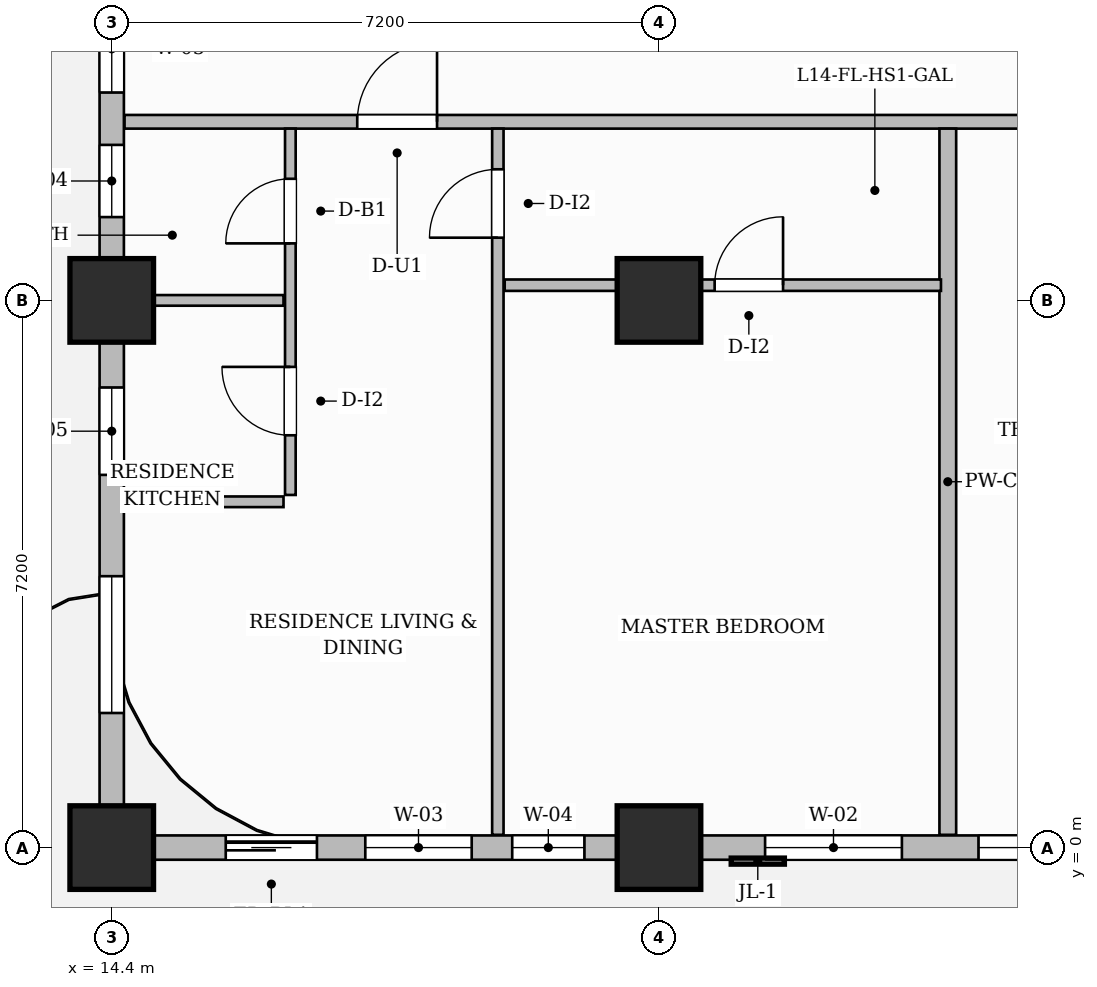
"""IFC4 building model, lengths in metres.
Left out: names, types, materials, properties, quantities, classifications, styles, units other than length and angle.
Written with IfcOpenShell. Run it as: python <this file> out.ifc"""

import sys

from ifc_helpers import new_model, si_unit, direction, frame, frame_2d, origin, origin_2d, place, context, subcontext, project, spatial, rectangle, extrude, source, transform, mapped, element, fill, save


model = new_model("IFC4")
c1 = context("Model", 3, precision=1e-05, world=origin(), true_north=direction((0.0, 1.0)))
c2 = subcontext(c1, "Body", "Model", "MODEL_VIEW")
j1 = project(units=[si_unit("LENGTHUNIT", "METRE"), si_unit("PLANEANGLEUNIT", "RADIAN")], contexts=[c1])
p1 = place(None, origin())
s1 = spatial("IfcSite", under=j1, at=p1, CompositionType="ELEMENT")
p2 = place(p1, origin())
s2 = spatial("IfcBuilding", under=s1, at=p2, CompositionType="ELEMENT")
p3 = place(p2, frame((0.0, 0.0, 62.0)))
s3 = spatial("IfcBuildingStorey", under=s2, at=p3, CompositionType="ELEMENT", Elevation=62.0)
m1 = source(origin(), c2, "Body", "SweptSolid", [
    extrude(rectangle(XDim=1.1, YDim=1.1, at=origin_2d()), origin(), (0.0, 0.0, 1.0), 3.7),
])
for number, where, z_axis, x_axis in (
    (1, (14.4, 0.0, 0.0), (0.0, 0.0, 1.0), (1.0, 0.0, 0.0)),
    (2, (14.4, 7.2, 0.0), (0.0, 0.0, 1.0), (1.0, 0.0, 0.0)),
    (3, (21.6, 0.0, 0.0), (0.0, 0.0, 1.0), (1.0, 0.0, 0.0)),
    (4, (21.6, 7.2, 0.0), (0.0, 0.0, 1.0), (1.0, 0.0, 0.0)),
):
    element("IfcColumn", number, at=place(p3, frame(where, z_axis=z_axis, x_axis=x_axis)), inside=s3, PredefinedType="COLUMN", context=c2, shape_type="MappedRepresentation", body=[
        mapped(m1, transform((0.0, 0.0, 0.0), scale=1.0)),
    ])
p4 = place(p3, frame((14.568, 9.55, 0.0), z_axis=(0.0, 0.0, 1.0), x_axis=(1.0, 0.0, 0.0)))
e5 = element("IfcWall", 5, at=p4, inside=s3, PredefinedType="PARTITIONING", context=c2, shape_type="SweptSolid", body=[
    extrude(rectangle(XDim=15.542, YDim=0.18, at=frame_2d((7.771, 0.0))), origin(), (0.0, 0.0, 1.0), 3.45),
])
p5 = place(p4, frame((3.062, 0.0, 0.0)))
e6 = element("IfcOpeningElement", 6, at=p5, cuts=e5, PredefinedType="OPENING", context=c2, shape_type="SweptSolid", body=[
    extrude(rectangle(XDim=1.05, YDim=2.25, at=frame_2d((0.525, 1.125))), frame((0.0, 0.1, 0.0), z_axis=(0.0, -1.0, 0.0), x_axis=(1.0, 0.0, 0.0)), (0.0, 0.0, 1.0), 0.2),
])
p6 = place(p4, frame((12.532, 0.0, 0.0)))
e7 = element("IfcOpeningElement", 7, at=p6, cuts=e5, PredefinedType="OPENING", context=c2, shape_type="SweptSolid", body=[
    extrude(rectangle(XDim=1.4, YDim=2.35, at=frame_2d((0.7, 1.175))), frame((0.0, 0.1, 0.0), z_axis=(0.0, -1.0, 0.0), x_axis=(1.0, 0.0, 0.0)), (0.0, 0.0, 1.0), 0.2),
])
p7 = place(p3, frame((25.4, 0.168, 0.0), z_axis=(0.0, 0.0, 1.0), x_axis=(0.0, 1.0, 0.0)))
e8 = element("IfcWall", 8, at=p7, inside=s3, PredefinedType="PARTITIONING", context=c2, shape_type="SweptSolid", body=[
    extrude(rectangle(XDim=9.292, YDim=0.22, at=frame_2d((4.646, 0.0))), origin(), (0.0, 0.0, 1.0), 3.035),
])
p8 = place(p3, frame((16.75, 4.64, 0.0), z_axis=(0.0, 0.0, 1.0), x_axis=(0.0, 1.0, 0.0)))
e9 = element("IfcWall", 9, at=p8, inside=s3, PredefinedType="PARTITIONING", context=c2, shape_type="SweptSolid", body=[
    extrude(rectangle(XDim=4.82, YDim=0.14, at=frame_2d((2.41, 0.0))), origin(), (0.0, 0.0, 1.0), 3.45),
])
p9 = place(p8, frame((0.785, 0.0, 0.0)))
e10 = element("IfcOpeningElement", 10, at=p9, cuts=e9, PredefinedType="OPENING", context=c2, shape_type="SweptSolid", body=[
    extrude(rectangle(XDim=0.9, YDim=2.15, at=frame_2d((0.45, 1.075))), frame((0.0, 0.08, 0.0), z_axis=(0.0, -1.0, 0.0), x_axis=(1.0, 0.0, 0.0)), (0.0, 0.0, 1.0), 0.16),
])
p10 = place(p8, frame((3.31, 0.0, 0.0)))
e11 = element("IfcOpeningElement", 11, at=p10, cuts=e9, PredefinedType="OPENING", context=c2, shape_type="SweptSolid", body=[
    extrude(rectangle(XDim=0.85, YDim=2.1, at=frame_2d((0.425, 1.05))), frame((0.0, 0.08, 0.0), z_axis=(0.0, -1.0, 0.0), x_axis=(1.0, 0.0, 0.0)), (0.0, 0.0, 1.0), 0.16),
])
p11 = place(p3, frame((14.59, 7.2, 0.0), z_axis=(0.0, 0.0, 1.0), x_axis=(1.0, 0.0, 0.0)))
e12 = element("IfcWall", 12, at=p11, inside=s3, PredefinedType="PARTITIONING", context=c2, shape_type="SweptSolid", body=[
    extrude(rectangle(XDim=2.07, YDim=0.14, at=frame_2d((1.035, 0.0))), origin(), (0.0, 0.0, 1.0), 2.885),
])
p12 = place(p3, frame((14.568, 4.55, 0.0), z_axis=(0.0, 0.0, 1.0), x_axis=(1.0, 0.0, 0.0)))
e13 = element("IfcWall", 13, at=p12, inside=s3, PredefinedType="PARTITIONING", context=c2, shape_type="SweptSolid", body=[
    extrude(rectangle(XDim=2.092, YDim=0.14, at=frame_2d((1.046, 0.0))), origin(), (0.0, 0.0, 1.0), 3.45),
])
p13 = place(p3, frame((19.48, 0.168, 0.0), z_axis=(0.0, 0.0, 1.0), x_axis=(0.0, 1.0, 0.0)))
e14 = element("IfcWall", 14, at=p13, inside=s3, PredefinedType="PARTITIONING", context=c2, shape_type="SweptSolid", body=[
    extrude(rectangle(XDim=9.292, YDim=0.15, at=frame_2d((4.646, 0.0))), origin(), (0.0, 0.0, 1.0), 3.45),
])
p14 = place(p13, frame((7.857, 0.0, 0.0)))
e15 = element("IfcOpeningElement", 15, at=p14, cuts=e14, PredefinedType="OPENING", context=c2, shape_type="SweptSolid", body=[
    extrude(rectangle(XDim=0.9, YDim=2.15, at=frame_2d((0.45, 1.075))), frame((0.0, 0.085, 0.0), z_axis=(0.0, -1.0, 0.0), x_axis=(1.0, 0.0, 0.0)), (0.0, 0.0, 1.0), 0.17),
])
p15 = place(p3, frame((19.57, 7.4, 0.0), z_axis=(0.0, 0.0, 1.0), x_axis=(1.0, 0.0, 0.0)))
e16 = element("IfcWall", 16, at=p15, inside=s3, PredefinedType="PARTITIONING", context=c2, shape_type="SweptSolid", body=[
    extrude(rectangle(XDim=5.74, YDim=0.15, at=frame_2d((2.87, 0.0))), origin(), (0.0, 0.0, 1.0), 2.885),
])
p16 = place(p15, frame((2.762, 0.0, 0.0)))
e17 = element("IfcOpeningElement", 17, at=p16, cuts=e16, PredefinedType="OPENING", context=c2, shape_type="SweptSolid", body=[
    extrude(rectangle(XDim=0.9, YDim=2.15, at=frame_2d((0.45, 1.075))), frame((0.0, 0.085, 0.0), z_axis=(0.0, -1.0, 0.0), x_axis=(1.0, 0.0, 0.0)), (0.0, 0.0, 1.0), 0.17),
])
p17 = place(p3, frame((14.4, 0.0, 0.0), z_axis=(0.0, 0.0, 1.0), x_axis=(1.0, 0.0, 0.0)))
e18 = element("IfcWall", 18, at=p17, inside=s3, PredefinedType="SOLIDWALL", context=c2, shape_type="SweptSolid", body=[
    extrude(rectangle(XDim=43.2, YDim=0.32, at=frame_2d((21.6, 0.0))), origin(), (0.0, 0.0, 1.0), 2.885),
])
p18 = place(p17, frame((1.5, 0.0, 0.0)))
e19 = element("IfcOpeningElement", 19, at=p18, cuts=e18, PredefinedType="OPENING", context=c2, shape_type="SweptSolid", body=[
    extrude(rectangle(XDim=1.2, YDim=2.2, at=frame_2d((0.6, 1.1))), frame((0.0, 0.17, 0.0), z_axis=(0.0, -1.0, 0.0), x_axis=(1.0, 0.0, 0.0)), (0.0, 0.0, 1.0), 0.34),
])
p19 = place(p17, frame((3.336, 0.0, 0.8)))
e20 = element("IfcOpeningElement", 20, at=p19, cuts=e18, PredefinedType="OPENING", context=c2, shape_type="SweptSolid", body=[
    extrude(rectangle(XDim=1.4, YDim=1.85, at=frame_2d((0.7, 0.925))), frame((0.0, 0.17, 0.0), z_axis=(0.0, -1.0, 0.0), x_axis=(1.0, 0.0, 0.0)), (0.0, 0.0, 1.0), 0.34),
])
p20 = place(p17, frame((5.269, 0.0, 0.8)))
e21 = element("IfcOpeningElement", 21, at=p20, cuts=e18, PredefinedType="OPENING", context=c2, shape_type="SweptSolid", body=[
    extrude(rectangle(XDim=0.95, YDim=1.75, at=frame_2d((0.475, 0.875))), frame((0.0, 0.17, 0.0), z_axis=(0.0, -1.0, 0.0), x_axis=(1.0, 0.0, 0.0)), (0.0, 0.0, 1.0), 0.34),
])
p21 = place(p17, frame((8.596, 0.0, 0.8)))
e22 = element("IfcOpeningElement", 22, at=p21, cuts=e18, PredefinedType="OPENING", context=c2, shape_type="SweptSolid", body=[
    extrude(rectangle(XDim=1.8, YDim=1.85, at=frame_2d((0.9, 0.925))), frame((0.0, 0.17, 0.0), z_axis=(0.0, -1.0, 0.0), x_axis=(1.0, 0.0, 0.0)), (0.0, 0.0, 1.0), 0.34),
])
p22 = place(p17, frame((11.404, 0.0, 0.8)))
e23 = element("IfcOpeningElement", 23, at=p22, cuts=e18, PredefinedType="OPENING", context=c2, shape_type="SweptSolid", body=[
    extrude(rectangle(XDim=1.8, YDim=1.85, at=frame_2d((0.9, 0.925))), frame((0.0, 0.17, 0.0), z_axis=(0.0, -1.0, 0.0), x_axis=(1.0, 0.0, 0.0)), (0.0, 0.0, 1.0), 0.34),
])
p23 = place(p17, frame((16.804, 0.0, 0.8)))
e24 = element("IfcOpeningElement", 24, at=p23, cuts=e18, PredefinedType="OPENING", context=c2, shape_type="SweptSolid", body=[
    extrude(rectangle(XDim=1.8, YDim=1.85, at=frame_2d((0.9, 0.925))), frame((0.0, 0.17, 0.0), z_axis=(0.0, -1.0, 0.0), x_axis=(1.0, 0.0, 0.0)), (0.0, 0.0, 1.0), 0.34),
])
p24 = place(p17, frame((21.725, 0.0, 0.8)))
e25 = element("IfcOpeningElement", 25, at=p24, cuts=e18, PredefinedType="OPENING", context=c2, shape_type="SweptSolid", body=[
    extrude(rectangle(XDim=1.8, YDim=1.85, at=frame_2d((0.9, 0.925))), frame((0.0, 0.17, 0.0), z_axis=(0.0, -1.0, 0.0), x_axis=(1.0, 0.0, 0.0)), (0.0, 0.0, 1.0), 0.34),
])
p25 = place(p17, frame((24.475, 0.0, 0.8)))
e26 = element("IfcOpeningElement", 26, at=p25, cuts=e18, PredefinedType="OPENING", context=c2, shape_type="SweptSolid", body=[
    extrude(rectangle(XDim=1.8, YDim=1.85, at=frame_2d((0.9, 0.925))), frame((0.0, 0.17, 0.0), z_axis=(0.0, -1.0, 0.0), x_axis=(1.0, 0.0, 0.0)), (0.0, 0.0, 1.0), 0.34),
])
p26 = place(p17, frame((29.075, 0.0, 0.8)))
e27 = element("IfcOpeningElement", 27, at=p26, cuts=e18, PredefinedType="OPENING", context=c2, shape_type="SweptSolid", body=[
    extrude(rectangle(XDim=1.8, YDim=1.85, at=frame_2d((0.9, 0.925))), frame((0.0, 0.17, 0.0), z_axis=(0.0, -1.0, 0.0), x_axis=(1.0, 0.0, 0.0)), (0.0, 0.0, 1.0), 0.34),
])
p27 = place(p17, frame((32.125, 0.0, 0.8)))
e28 = element("IfcOpeningElement", 28, at=p27, cuts=e18, PredefinedType="OPENING", context=c2, shape_type="SweptSolid", body=[
    extrude(rectangle(XDim=1.8, YDim=1.85, at=frame_2d((0.9, 0.925))), frame((0.0, 0.17, 0.0), z_axis=(0.0, -1.0, 0.0), x_axis=(1.0, 0.0, 0.0)), (0.0, 0.0, 1.0), 0.34),
])
p28 = place(p17, frame((36.875, 0.0, 0.8)))
e29 = element("IfcOpeningElement", 29, at=p28, cuts=e18, PredefinedType="OPENING", context=c2, shape_type="SweptSolid", body=[
    extrude(rectangle(XDim=1.8, YDim=1.85, at=frame_2d((0.9, 0.925))), frame((0.0, 0.17, 0.0), z_axis=(0.0, -1.0, 0.0), x_axis=(1.0, 0.0, 0.0)), (0.0, 0.0, 1.0), 0.34),
])
p29 = place(p17, frame((39.925, 0.0, 0.8)))
e30 = element("IfcOpeningElement", 30, at=p29, cuts=e18, PredefinedType="OPENING", context=c2, shape_type="SweptSolid", body=[
    extrude(rectangle(XDim=1.8, YDim=1.85, at=frame_2d((0.9, 0.925))), frame((0.0, 0.17, 0.0), z_axis=(0.0, -1.0, 0.0), x_axis=(1.0, 0.0, 0.0)), (0.0, 0.0, 1.0), 0.34),
])
p30 = place(p3, frame((14.4, 0.05, 0.0), z_axis=(0.0, 0.0, 1.0), x_axis=(0.0, 1.0, 0.0)))
e31 = element("IfcWall", 31, at=p30, inside=s3, PredefinedType="SOLIDWALL", context=c2, shape_type="SweptSolid", body=[
    extrude(rectangle(XDim=21.5, YDim=0.32, at=frame_2d((10.75, 0.0))), origin(), (0.0, 0.0, 1.0), 2.885),
])
p31 = place(p30, frame((1.721, 0.0, 0.8)))
e32 = element("IfcOpeningElement", 32, at=p31, cuts=e31, PredefinedType="OPENING", context=c2, shape_type="SweptSolid", body=[
    extrude(rectangle(XDim=1.8, YDim=1.85, at=frame_2d((0.9, 0.925))), frame((0.0, 0.17, 0.0), z_axis=(0.0, -1.0, 0.0), x_axis=(1.0, 0.0, 0.0)), (0.0, 0.0, 1.0), 0.34),
])
p32 = place(p30, frame((4.854, 0.0, 0.8)))
e33 = element("IfcOpeningElement", 33, at=p32, cuts=e31, PredefinedType="OPENING", context=c2, shape_type="SweptSolid", body=[
    extrude(rectangle(XDim=1.15, YDim=1.8, at=frame_2d((0.575, 0.9))), frame((0.0, 0.17, 0.0), z_axis=(0.0, -1.0, 0.0), x_axis=(1.0, 0.0, 0.0)), (0.0, 0.0, 1.0), 0.34),
])
p33 = place(p30, frame((8.246, 0.0, 0.8)))
e34 = element("IfcOpeningElement", 34, at=p33, cuts=e31, PredefinedType="OPENING", context=c2, shape_type="SweptSolid", body=[
    extrude(rectangle(XDim=0.95, YDim=1.75, at=frame_2d((0.475, 0.875))), frame((0.0, 0.17, 0.0), z_axis=(0.0, -1.0, 0.0), x_axis=(1.0, 0.0, 0.0)), (0.0, 0.0, 1.0), 0.34),
])
p34 = place(p30, frame((9.885, 0.0, 0.8)))
e35 = element("IfcOpeningElement", 35, at=p34, cuts=e31, PredefinedType="OPENING", context=c2, shape_type="SweptSolid", body=[
    extrude(rectangle(XDim=1.15, YDim=1.8, at=frame_2d((0.575, 0.9))), frame((0.0, 0.17, 0.0), z_axis=(0.0, -1.0, 0.0), x_axis=(1.0, 0.0, 0.0)), (0.0, 0.0, 1.0), 0.34),
])
p35 = place(p30, frame((11.789, 0.0, 0.8)))
e36 = element("IfcOpeningElement", 36, at=p35, cuts=e31, PredefinedType="OPENING", context=c2, shape_type="SweptSolid", body=[
    extrude(rectangle(XDim=1.4, YDim=1.85, at=frame_2d((0.7, 0.925))), frame((0.0, 0.17, 0.0), z_axis=(0.0, -1.0, 0.0), x_axis=(1.0, 0.0, 0.0)), (0.0, 0.0, 1.0), 0.34),
])
p36 = place(p30, frame((15.675, 0.0, 0.8)))
e37 = element("IfcOpeningElement", 37, at=p36, cuts=e31, PredefinedType="OPENING", context=c2, shape_type="SweptSolid", body=[
    extrude(rectangle(XDim=1.8, YDim=1.85, at=frame_2d((0.9, 0.925))), frame((0.0, 0.17, 0.0), z_axis=(0.0, -1.0, 0.0), x_axis=(1.0, 0.0, 0.0)), (0.0, 0.0, 1.0), 0.34),
])
p37 = place(p30, frame((18.425, 0.0, 0.8)))
e38 = element("IfcOpeningElement", 38, at=p37, cuts=e31, PredefinedType="OPENING", context=c2, shape_type="SweptSolid", body=[
    extrude(rectangle(XDim=1.8, YDim=1.85, at=frame_2d((0.9, 0.925))), frame((0.0, 0.17, 0.0), z_axis=(0.0, -1.0, 0.0), x_axis=(1.0, 0.0, 0.0)), (0.0, 0.0, 1.0), 0.34),
])
m2 = source(origin(), c2, "Body", "SweptSolid", [
    extrude(rectangle(XDim=0.9, YDim=2.15, at=frame_2d((0.45, 1.075))), frame((0.0, 0.025, 0.0), z_axis=(0.0, -1.0, 0.0), x_axis=(1.0, 0.0, 0.0)), (0.0, 0.0, 1.0), 0.05),
])
p38 = place(p9, origin())
e39 = element("IfcDoor", 39, at=p38, inside=s3, OperationType="SINGLE_SWING_RIGHT", PredefinedType="DOOR", context=c2, shape_type="MappedRepresentation", body=[
    mapped(m2, transform((0.0, 0.0, 0.0), scale=1.0)),
])
fill(e10, e39)
m3 = source(origin(), c2, "Body", "SweptSolid", [
    extrude(rectangle(XDim=0.85, YDim=2.1, at=frame_2d((0.425, 1.05))), frame((0.0, 0.025, 0.0), z_axis=(0.0, -1.0, 0.0), x_axis=(1.0, 0.0, 0.0)), (0.0, 0.0, 1.0), 0.05),
])
p39 = place(p10, origin())
e40 = element("IfcDoor", 40, at=p39, inside=s3, OperationType="SINGLE_SWING_LEFT", PredefinedType="DOOR", context=c2, shape_type="MappedRepresentation", body=[
    mapped(m3, transform((0.0, 0.0, 0.0), scale=1.0)),
])
fill(e11, e40)
m4 = source(origin(), c2, "Body", "SweptSolid", [
    extrude(rectangle(XDim=1.05, YDim=2.25, at=frame_2d((0.525, 1.125))), frame((0.0, 0.025, 0.0), z_axis=(0.0, -1.0, 0.0), x_axis=(1.0, 0.0, 0.0)), (0.0, 0.0, 1.0), 0.05),
])
p40 = place(p5, origin())
e41 = element("IfcDoor", 41, at=p40, inside=s3, OperationType="SINGLE_SWING_RIGHT", PredefinedType="DOOR", context=c2, shape_type="MappedRepresentation", body=[
    mapped(m4, transform((0.0, 0.0, 0.0), scale=1.0)),
])
fill(e6, e41)
p41 = place(p14, origin())
e42 = element("IfcDoor", 42, at=p41, inside=s3, OperationType="SINGLE_SWING_LEFT", PredefinedType="DOOR", context=c2, shape_type="MappedRepresentation", body=[
    mapped(m2, transform((0.0, 0.0, 0.0), scale=1.0)),
])
fill(e15, e42)
p42 = place(p16, origin())
e43 = element("IfcDoor", 43, at=p42, inside=s3, OperationType="SINGLE_SWING_RIGHT", PredefinedType="DOOR", context=c2, shape_type="MappedRepresentation", body=[
    mapped(m2, transform((0.0, 0.0, 0.0), scale=1.0)),
])
fill(e17, e43)
m5 = source(origin(), c2, "Body", "SweptSolid", [
    extrude(rectangle(XDim=1.2, YDim=2.2, at=frame_2d((0.6, 1.1))), frame((0.0, 0.025, 0.0), z_axis=(0.0, -1.0, 0.0), x_axis=(1.0, 0.0, 0.0)), (0.0, 0.0, 1.0), 0.05),
])
p43 = place(p18, origin())
e44 = element("IfcDoor", 44, at=p43, inside=s3, OperationType="SLIDING_TO_LEFT", PredefinedType="DOOR", context=c2, shape_type="MappedRepresentation", body=[
    mapped(m5, transform((0.0, 0.0, 0.0), scale=1.0)),
])
fill(e19, e44)
m6 = source(origin(), c2, "Body", "SweptSolid", [
    extrude(rectangle(XDim=1.4, YDim=1.85, at=frame_2d((0.7, 0.925))), frame((0.0, 0.03, 0.0), z_axis=(0.0, -1.0, 0.0), x_axis=(1.0, 0.0, 0.0)), (0.0, 0.0, 1.0), 0.06),
])
p44 = place(p19, origin())
e45 = element("IfcWindow", 45, at=p44, inside=s3, PartitioningType="SINGLE_PANEL", PredefinedType="WINDOW", context=c2, shape_type="MappedRepresentation", body=[
    mapped(m6, transform((0.0, 0.0, 0.0), scale=1.0)),
])
fill(e20, e45)
m7 = source(origin(), c2, "Body", "SweptSolid", [
    extrude(rectangle(XDim=0.95, YDim=1.75, at=frame_2d((0.475, 0.875))), frame((0.0, 0.03, 0.0), z_axis=(0.0, -1.0, 0.0), x_axis=(1.0, 0.0, 0.0)), (0.0, 0.0, 1.0), 0.06),
])
p45 = place(p20, origin())
e46 = element("IfcWindow", 46, at=p45, inside=s3, PartitioningType="SINGLE_PANEL", PredefinedType="WINDOW", context=c2, shape_type="MappedRepresentation", body=[
    mapped(m7, transform((0.0, 0.0, 0.0), scale=1.0)),
])
fill(e21, e46)
m8 = source(origin(), c2, "Body", "SweptSolid", [
    extrude(rectangle(XDim=1.8, YDim=1.85, at=frame_2d((0.9, 0.925))), frame((0.0, 0.03, 0.0), z_axis=(0.0, -1.0, 0.0), x_axis=(1.0, 0.0, 0.0)), (0.0, 0.0, 1.0), 0.06),
])
p46 = place(p21, origin())
e47 = element("IfcWindow", 47, at=p46, inside=s3, PartitioningType="DOUBLE_PANEL_VERTICAL", PredefinedType="WINDOW", context=c2, shape_type="MappedRepresentation", body=[
    mapped(m8, transform((0.0, 0.0, 0.0), scale=1.0)),
])
fill(e22, e47)
p47 = place(p22, origin())
e48 = element("IfcWindow", 48, at=p47, inside=s3, PartitioningType="DOUBLE_PANEL_VERTICAL", PredefinedType="WINDOW", context=c2, shape_type="MappedRepresentation", body=[
    mapped(m8, transform((0.0, 0.0, 0.0), scale=1.0)),
])
fill(e23, e48)
p48 = place(p31, origin())
e49 = element("IfcWindow", 49, at=p48, inside=s3, PartitioningType="DOUBLE_PANEL_VERTICAL", PredefinedType="WINDOW", context=c2, shape_type="MappedRepresentation", body=[
    mapped(m8, transform((0.0, 0.0, 0.0), scale=1.0)),
])
fill(e32, e49)
m9 = source(origin(), c2, "Body", "SweptSolid", [
    extrude(rectangle(XDim=1.15, YDim=1.8, at=frame_2d((0.575, 0.9))), frame((0.0, 0.03, 0.0), z_axis=(0.0, -1.0, 0.0), x_axis=(1.0, 0.0, 0.0)), (0.0, 0.0, 1.0), 0.06),
])
p49 = place(p32, origin())
e50 = element("IfcWindow", 50, at=p49, inside=s3, PartitioningType="SINGLE_PANEL", PredefinedType="WINDOW", context=c2, shape_type="MappedRepresentation", body=[
    mapped(m9, transform((0.0, 0.0, 0.0), scale=1.0)),
])
fill(e33, e50)
p50 = place(p33, origin())
e51 = element("IfcWindow", 51, at=p50, inside=s3, PartitioningType="SINGLE_PANEL", PredefinedType="WINDOW", context=c2, shape_type="MappedRepresentation", body=[
    mapped(m7, transform((0.0, 0.0, 0.0), scale=1.0)),
])
fill(e34, e51)
p51 = place(p34, origin())
e52 = element("IfcWindow", 52, at=p51, inside=s3, PartitioningType="SINGLE_PANEL", PredefinedType="WINDOW", context=c2, shape_type="MappedRepresentation", body=[
    mapped(m9, transform((0.0, 0.0, 0.0), scale=1.0)),
])
fill(e35, e52)
save(model, sys.argv[1])
